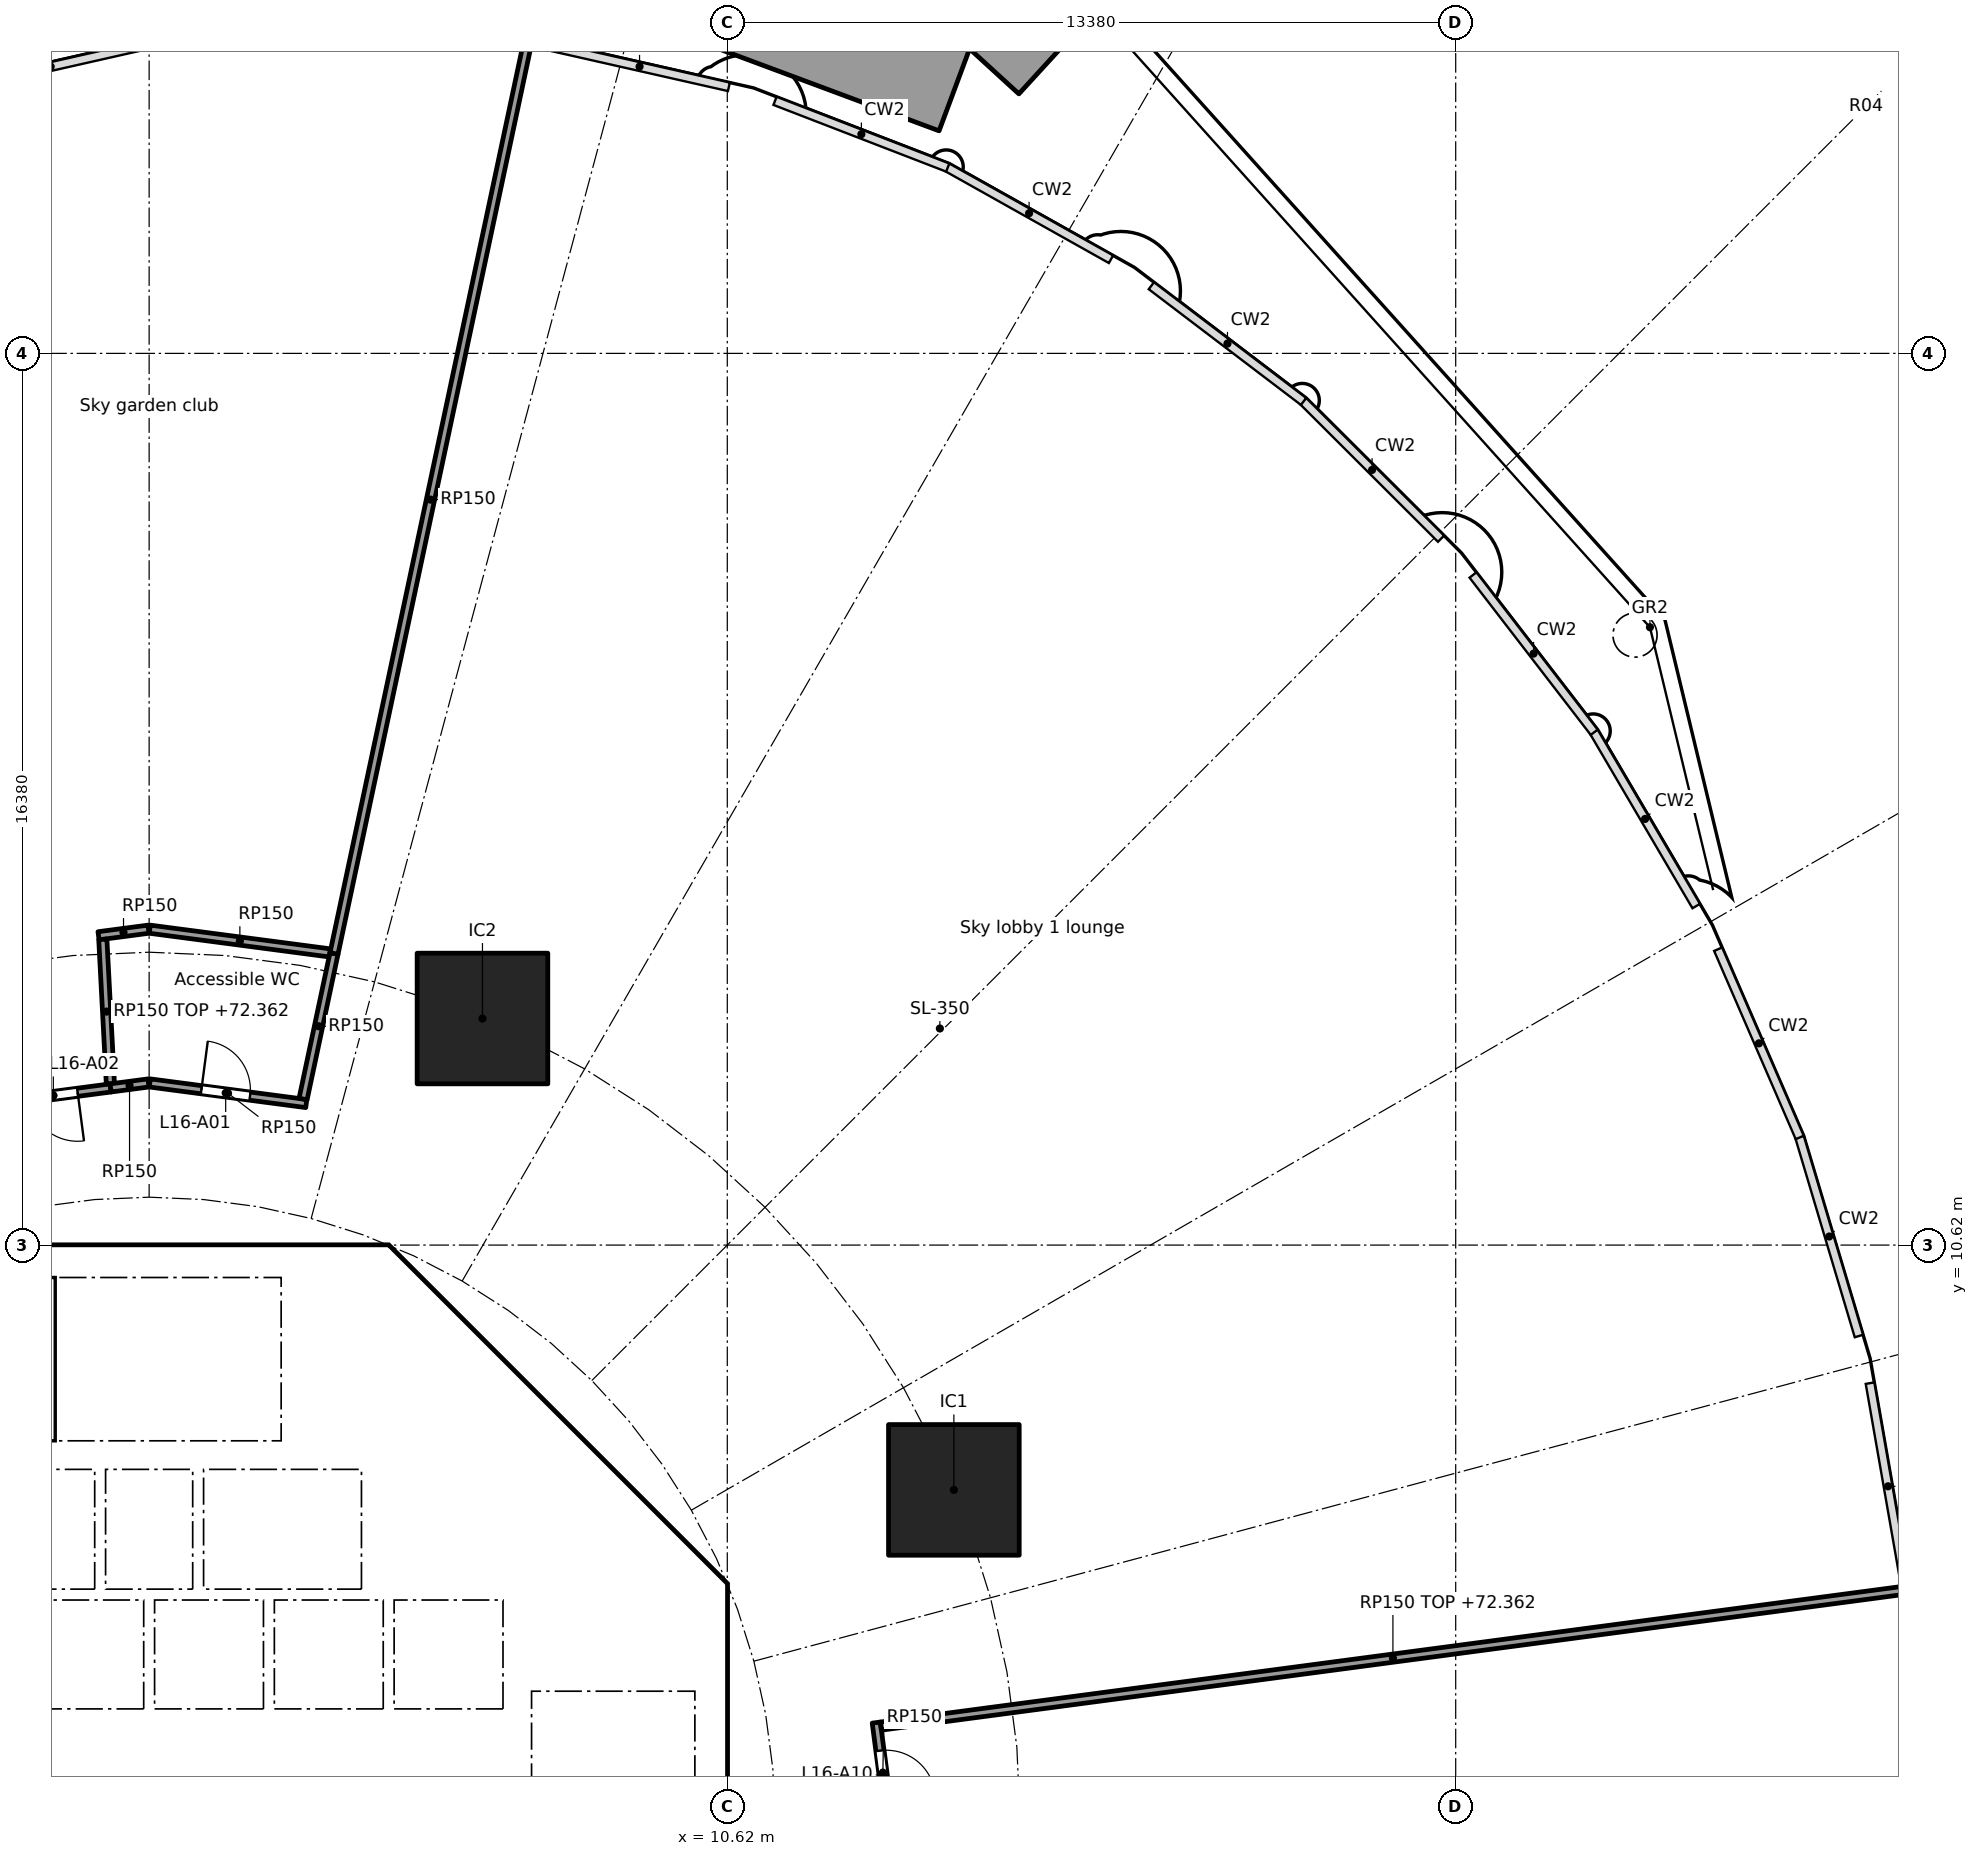
"""IFC4 building model, lengths in metres.
Left out: names, types, materials, properties, quantities, classifications, styles, units other than length and angle.
Written with IfcOpenShell. Run it as: python <this file> out.ifc"""

import sys

from ifc_helpers import new_model, si_unit, direction, frame, frame_2d, origin, origin_2d, place, context, subcontext, project, spatial, polyline, rectangle, outline, extrude, element, fill, save


model = new_model("IFC4")
c1 = context("Model", 3, precision=1e-05, world=origin(), true_north=direction((0.0, 1.0)))
c2 = subcontext(c1, "Body", "Model", "MODEL_VIEW")
j1 = project(units=[si_unit("LENGTHUNIT", "METRE"), si_unit("PLANEANGLEUNIT", "RADIAN")], contexts=[c1])
p1 = place(None, origin())
s1 = spatial("IfcSite", under=j1, at=p1, CompositionType="ELEMENT")
p2 = place(p1, origin())
s2 = spatial("IfcBuilding", under=s1, at=p2, CompositionType="ELEMENT")
p3 = place(p2, frame((0.0, 0.0, 67.7)))
s3 = spatial("IfcBuildingStorey", under=s2, at=p3, CompositionType="ELEMENT", Elevation=67.7)
for number, where, z_axis, x_axis in (
    (1, (14.782, 6.123, 0.0), (0.0, 0.0, 1.0), (1.0, 0.0, 0.0)),
    (2, (6.123, 14.782, 0.0), (0.0, 0.0, 1.0), (1.0, 0.0, 0.0)),
):
    element("IfcColumn", number, at=place(p3, frame(where, z_axis=z_axis, x_axis=x_axis)), inside=s3, PredefinedType="COLUMN", context=c2, shape_type="SweptSolid", body=[
        extrude(rectangle(XDim=2.4, YDim=2.4, at=origin_2d()), origin(), (0.0, 0.0, 1.0), 5.6),
    ])
p4 = place(p3, frame((13.458, 35.156, 0.0), z_axis=(0.0, 0.0, 1.0), x_axis=(0.737628171865, -0.67520713864, 0.0)))
e3 = element("IfcWall", 3, at=p4, inside=s3, PredefinedType="SOLIDWALL", context=c2, shape_type="SweptSolid", body=[
    extrude(rectangle(XDim=4.146, YDim=1.6, at=frame_2d((2.073, 0.0))), origin(), (0.0, 0.0, 1.0), 1.1),
])
p5 = place(p3, frame((14.789, 31.838, 0.0), z_axis=(0.0, 0.0, 1.0), x_axis=(-0.937198795284, 0.348795668148, 0.0)))
e4 = element("IfcWall", 4, at=p5, inside=s3, PredefinedType="SOLIDWALL", context=c2, shape_type="SweptSolid", body=[
    extrude(rectangle(XDim=9.981, YDim=1.6, at=frame_2d((4.991, 0.0))), origin(), (0.0, 0.0, 1.0), 1.1),
])
p6 = place(p3, frame((9.988, 4.613, 0.0), z_axis=(0.0, 0.0, 1.0), x_axis=(-0.707106781187, 0.707106781187, 0.0)))
e5 = element("IfcWall", 5, at=p6, inside=s3, PredefinedType="SHEAR", context=c2, shape_type="SweptSolid", body=[
    extrude(rectangle(XDim=7.602, YDim=0.6, at=frame_2d((3.801, 0.0))), origin(), (0.0, 0.0, 1.0), 5.34),
])
p7 = place(p6, frame((3.201, 0.0, 0.0)))
e6 = element("IfcOpeningElement", 6, at=p7, cuts=e5, PredefinedType="OPENING", context=c2, shape_type="SweptSolid", body=[
    extrude(rectangle(XDim=1.2, YDim=2.1, at=frame_2d((0.6, 1.05))), frame((0.0, 0.31, 0.0), z_axis=(0.0, -1.0, 0.0), x_axis=(1.0, 0.0, 0.0)), (0.0, 0.0, 1.0), 0.62),
])
p8 = place(p3, frame((4.0, 4.3, 0.0), z_axis=(0.0, 0.0, 1.0), x_axis=(0.0, 1.0, 0.0)))
e7 = element("IfcWall", 7, at=p8, inside=s3, PredefinedType="SOLIDWALL", context=c2, shape_type="SweptSolid", body=[
    extrude(rectangle(XDim=2.2, YDim=0.2, at=frame_2d((1.1, 0.0))), origin(), (0.0, 0.0, 1.0), 5.34),
])
p9 = place(p8, frame((0.55, 0.0, 0.0)))
e8 = element("IfcOpeningElement", 8, at=p9, cuts=e7, PredefinedType="OPENING", context=c2, shape_type="SweptSolid", body=[
    extrude(rectangle(XDim=1.1, YDim=2.1, at=frame_2d((0.55, 1.05))), frame((0.0, 0.11, 0.0), z_axis=(0.0, -1.0, 0.0), x_axis=(1.0, 0.0, 0.0)), (0.0, 0.0, 1.0), 0.22),
])
p10 = place(p3, frame((-6.7, 2.0, 0.0), z_axis=(0.0, 0.0, 1.0), x_axis=(1.0, 0.0, 0.0)))
e9 = element("IfcWall", 9, at=p10, inside=s3, PredefinedType="SOLIDWALL", context=c2, shape_type="SweptSolid", body=[
    extrude(rectangle(XDim=13.4, YDim=0.2, at=frame_2d((6.7, 0.0))), origin(), (0.0, 0.0, 1.0), 5.34),
])
p11 = place(p10, frame((0.65, 0.0, 0.0)))
e10 = element("IfcOpeningElement", 10, at=p11, cuts=e9, PredefinedType="OPENING", context=c2, shape_type="SweptSolid", body=[
    extrude(rectangle(XDim=1.1, YDim=2.1, at=frame_2d((0.55, 1.05))), frame((0.0, 0.11, 0.0), z_axis=(0.0, -1.0, 0.0), x_axis=(1.0, 0.0, 0.0)), (0.0, 0.0, 1.0), 0.22),
])
p12 = place(p10, frame((2.85, 0.0, 0.0)))
e11 = element("IfcOpeningElement", 11, at=p12, cuts=e9, PredefinedType="OPENING", context=c2, shape_type="SweptSolid", body=[
    extrude(rectangle(XDim=1.1, YDim=2.1, at=frame_2d((0.55, 1.05))), frame((0.0, 0.11, 0.0), z_axis=(0.0, -1.0, 0.0), x_axis=(1.0, 0.0, 0.0)), (0.0, 0.0, 1.0), 0.22),
])
p13 = place(p10, frame((5.05, 0.0, 0.0)))
e12 = element("IfcOpeningElement", 12, at=p13, cuts=e9, PredefinedType="OPENING", context=c2, shape_type="SweptSolid", body=[
    extrude(rectangle(XDim=1.1, YDim=2.1, at=frame_2d((0.55, 1.05))), frame((0.0, 0.11, 0.0), z_axis=(0.0, -1.0, 0.0), x_axis=(1.0, 0.0, 0.0)), (0.0, 0.0, 1.0), 0.22),
])
p14 = place(p3, frame((6.7, 4.0, 0.0), z_axis=(0.0, 0.0, 1.0), x_axis=(1.0, 0.0, 0.0)))
e13 = element("IfcWall", 13, at=p14, inside=s3, PredefinedType="SOLIDWALL", context=c2, shape_type="SweptSolid", body=[
    extrude(rectangle(XDim=3.325, YDim=0.2, at=frame_2d((1.662, 0.0))), origin(), (0.0, 0.0, 1.0), 5.34),
])
p15 = place(p14, frame((1.25, 0.0, 0.0)))
e14 = element("IfcOpeningElement", 14, at=p15, cuts=e13, PredefinedType="OPENING", context=c2, shape_type="SweptSolid", body=[
    extrude(rectangle(XDim=1.1, YDim=2.1, at=frame_2d((0.55, 1.05))), frame((0.0, 0.11, 0.0), z_axis=(0.0, -1.0, 0.0), x_axis=(1.0, 0.0, 0.0)), (0.0, 0.0, 1.0), 0.22),
])
p16 = place(p3, frame((4.0, 7.025, 0.0), z_axis=(0.0, 0.0, 1.0), x_axis=(0.0, 1.0, 0.0)))
e15 = element("IfcWall", 15, at=p16, inside=s3, PredefinedType="SOLIDWALL", context=c2, shape_type="SweptSolid", body=[
    extrude(rectangle(XDim=3.0, YDim=0.2, at=frame_2d((1.5, 0.0))), origin(), (0.0, 0.0, 1.0), 5.34),
])
p17 = place(p16, frame((0.925, 0.0, 0.0)))
e16 = element("IfcOpeningElement", 16, at=p17, cuts=e15, PredefinedType="OPENING", context=c2, shape_type="SweptSolid", body=[
    extrude(rectangle(XDim=1.1, YDim=2.1, at=frame_2d((0.55, 1.05))), frame((0.0, 0.11, 0.0), z_axis=(0.0, -1.0, 0.0), x_axis=(1.0, 0.0, 0.0)), (0.0, 0.0, 1.0), 0.22),
])
p18 = place(p3, origin())
e17 = element("IfcWall", 17, at=p18, inside=s3, PredefinedType="SHEAR", context=c2, shape_type="SweptSolid", body=[
    extrude(outline(polyline([(-4.152, 10.025), (-4.401, 9.776), (-4.825, 10.2), (-4.401, 10.625), (4.401, 10.625), (4.825, 10.2), (4.401, 9.776), (4.152, 10.025), (-4.152, 10.025)])), origin(), (0.0, 0.0, 1.0), 5.34),
])
p19 = place(p3, origin())
e18 = element("IfcWall", 18, at=p19, inside=s3, PredefinedType="SHEAR", context=c2, shape_type="SweptSolid", body=[
    extrude(outline(polyline([(9.776, -4.401), (10.025, -4.152), (10.025, -3.801), (10.025, 4.152), (9.776, 4.401), (10.2, 4.825), (10.625, 4.401), (10.625, -4.401), (10.2, -4.825), (9.776, -4.401)])), origin(), (0.0, 0.0, 1.0), 5.34),
])
for number, where, z_axis, x_axis in (
    (19, (-0.9, 4.3, 0.0), (0.0, 0.0, 1.0), (0.0, 1.0, 0.0)),
    (20, (0.9, 4.3, 0.0), (0.0, 0.0, 1.0), (0.0, 1.0, 0.0)),
):
    element("IfcWall", number, at=place(p3, frame(where, z_axis=z_axis, x_axis=x_axis)), inside=s3, PredefinedType="SOLIDWALL", context=c2, shape_type="SweptSolid", body=[
        extrude(rectangle(XDim=2.2, YDim=0.2, at=frame_2d((1.1, 0.0))), origin(), (0.0, 0.0, 1.0), 5.34),
    ])
p20 = place(p3, origin())
e21 = element("IfcWall", 21, at=p20, inside=s3, PredefinedType="SOLIDWALL", context=c2, shape_type="SweptSolid", body=[
    extrude(outline(polyline([(-6.5, 2.1), (-6.7, 2.1), (-6.7, 4.3), (6.7, 4.3), (6.7, 2.1), (6.5, 2.1), (6.5, 4.1), (4.5, 4.1), (4.5, 2.1), (4.3, 2.1), (4.3, 4.1), (2.3, 4.1), (2.3, 2.1), (2.1, 2.1), (2.1, 4.1), (0.1, 4.1), (0.1, 2.1), (-0.1, 2.1), (-0.1, 4.1), (-2.1, 4.1), (-2.1, 2.1), (-2.3, 2.1), (-2.3, 4.1), (-4.3, 4.1), (-4.3, 2.1), (-4.5, 2.1), (-4.5, 4.1), (-6.5, 4.1), (-6.5, 2.1)])), origin(), (0.0, 0.0, 1.0), 5.34),
])
p21 = place(p3, origin())
e22 = element("IfcWall", 22, at=p21, inside=s3, PredefinedType="SOLIDWALL", context=c2, shape_type="SweptSolid", body=[
    extrude(outline(polyline([(4.1, 6.5), (-4.1, 6.5), (-4.1, 7.025), (4.1, 7.025), (4.1, 6.5)])), origin(), (0.0, 0.0, 1.0), 5.34),
])
p22 = place(p3, origin())
e23 = element("IfcWall", 23, at=p22, inside=s3, PredefinedType="SOLIDWALL", context=c2, shape_type="SweptSolid", body=[
    extrude(outline(polyline([(7.025, -3.9), (6.7, -3.9), (6.7, 3.9), (7.025, 3.9), (7.025, -3.9)])), origin(), (0.0, 0.0, 1.0), 5.34),
])
p23 = place(p3, frame((-2.812, 13.23, 0.0), z_axis=(0.0, 0.0, 1.0), x_axis=(0.991438625664, 0.130573548402, 0.0)))
e24 = element("IfcWall", 24, at=p23, inside=s3, PredefinedType="PARTITIONING", context=c2, shape_type="SweptSolid", body=[
    extrude(rectangle(XDim=2.122, YDim=0.15, at=frame_2d((1.061, 0.0))), origin(), (0.0, 0.0, 1.0), 5.34),
])
p24 = place(p23, frame((0.611, 0.0, 0.0)))
e25 = element("IfcOpeningElement", 25, at=p24, cuts=e24, PredefinedType="OPENING", context=c2, shape_type="SweptSolid", body=[
    extrude(rectangle(XDim=0.9, YDim=2.1, at=frame_2d((0.45, 1.05))), frame((0.0, 0.085, 0.0), z_axis=(0.0, -1.0, 0.0), x_axis=(1.0, 0.0, 0.0)), (0.0, 0.0, 1.0), 0.17),
])
p25 = place(p3, frame((-0.929, 16.302, 0.0), z_axis=(0.0, 0.0, 1.0), x_axis=(0.991440824405, 0.130556852376, 0.0)))
e26 = element("IfcWall", 26, at=p25, inside=s3, PredefinedType="PARTITIONING", context=c2, shape_type="SweptSolid", body=[
    extrude(rectangle(XDim=0.926, YDim=0.15, at=frame_2d((0.463, 0.0))), origin(), (0.0, 0.0, 1.0), 5.34),
])
p26 = place(p3, frame((-0.712, 13.582, 0.0), z_axis=(0.0, 0.0, 1.0), x_axis=(-0.05235154686, 0.998628717563, 0.0)))
e27 = element("IfcWall", 27, at=p26, inside=s3, PredefinedType="PARTITIONING", context=c2, shape_type="SweptSolid", body=[
    extrude(rectangle(XDim=2.658, YDim=0.15, at=frame_2d((1.329, 0.0))), origin(), (0.0, 0.0, 1.0), 4.662),
])
p27 = place(p3, frame((-0.708, 13.507, 0.0), z_axis=(0.0, 0.0, 1.0), x_axis=(0.991466123966, 0.130364585024, 0.0)))
e28 = element("IfcWall", 28, at=p27, inside=s3, PredefinedType="PARTITIONING", context=c2, shape_type="SweptSolid", body=[
    extrude(rectangle(XDim=0.702, YDim=0.15, at=frame_2d((0.351, 0.0))), origin(), (0.0, 0.0, 1.0), 5.34),
])
p28 = place(p3, frame((0.012, 13.598, 0.0), z_axis=(0.0, 0.0, 1.0), x_axis=(0.991448563319, -0.13049807007, 0.0)))
e29 = element("IfcWall", 29, at=p28, inside=s3, PredefinedType="PARTITIONING", context=c2, shape_type="SweptSolid", body=[
    extrude(rectangle(XDim=2.9, YDim=0.15, at=frame_2d((1.45, 0.0))), origin(), (0.0, 0.0, 1.0), 5.34),
])
p29 = place(p28, frame((0.956, 0.0, 0.0)))
e30 = element("IfcOpeningElement", 30, at=p29, cuts=e29, PredefinedType="OPENING", context=c2, shape_type="SweptSolid", body=[
    extrude(rectangle(XDim=0.9, YDim=2.1, at=frame_2d((0.45, 1.05))), frame((0.0, 0.085, 0.0), z_axis=(0.0, -1.0, 0.0), x_axis=(1.0, 0.0, 0.0)), (0.0, 0.0, 1.0), 0.17),
])
p30 = place(p3, frame((0.012, 16.423, 0.0), z_axis=(0.0, 0.0, 1.0), x_axis=(0.991441844339, -0.130549106827, 0.0)))
e31 = element("IfcWall", 31, at=p30, inside=s3, PredefinedType="PARTITIONING", context=c2, shape_type="SweptSolid", body=[
    extrude(rectangle(XDim=3.338, YDim=0.15, at=frame_2d((1.669, 0.0))), origin(), (0.0, 0.0, 1.0), 5.34),
])
p31 = place(p3, frame((2.828, 13.303, 0.0), z_axis=(0.0, 0.0, 1.0), x_axis=(0.207936738153, 0.978142276423, 0.0)))
e32 = element("IfcWall", 32, at=p31, inside=s3, PredefinedType="PARTITIONING", context=c2, shape_type="SweptSolid", body=[
    extrude(rectangle(XDim=2.733, YDim=0.15, at=frame_2d((1.367, 0.0))), origin(), (0.0, 0.0, 1.0), 5.34),
])
p32 = place(p3, frame((3.396, 15.977, 0.0), z_axis=(0.0, 0.0, 1.0), x_axis=(0.207917852081, 0.978146291097, 0.0)))
e33 = element("IfcWall", 33, at=p32, inside=s3, PredefinedType="PARTITIONING", context=c2, shape_type="SweptSolid", body=[
    extrude(rectangle(XDim=17.046, YDim=0.15, at=frame_2d((8.523, 0.0))), origin(), (0.0, 0.0, 1.0), 5.34),
])
p33 = place(p3, frame((13.357, 1.848, 0.0), z_axis=(0.0, 0.0, 1.0), x_axis=(0.130471558159, -0.991452052553, 0.0)))
e34 = element("IfcWall", 34, at=p33, inside=s3, PredefinedType="PARTITIONING", context=c2, shape_type="SweptSolid", body=[
    extrude(rectangle(XDim=1.853, YDim=0.15, at=frame_2d((0.926, 0.0))), origin(), (0.0, 0.0, 1.0), 5.34),
])
p34 = place(p33, frame((0.52, 0.0, 0.0)))
e35 = element("IfcOpeningElement", 35, at=p34, cuts=e34, PredefinedType="OPENING", context=c2, shape_type="SweptSolid", body=[
    extrude(rectangle(XDim=0.9, YDim=2.1, at=frame_2d((0.45, 1.05))), frame((0.0, 0.085, 0.0), z_axis=(0.0, -1.0, 0.0), x_axis=(1.0, 0.0, 0.0)), (0.0, 0.0, 1.0), 0.17),
])
p35 = place(p3, frame((32.253, 4.281, 0.0), z_axis=(0.0, 0.0, 1.0), x_axis=(-0.991305479384, -0.131580570535, 0.0)))
e36 = element("IfcWall", 36, at=p35, inside=s3, PredefinedType="PARTITIONING", context=c2, shape_type="SweptSolid", body=[
    extrude(rectangle(XDim=18.978, YDim=0.15, at=frame_2d((9.489, 0.0))), origin(), (0.0, 0.0, 1.0), 4.662),
])
p36 = place(p13, origin())
e37 = element("IfcDoor", 37, at=p36, inside=s3, OperationType="DOUBLE_DOOR_SLIDING", PredefinedType="DOOR", context=c2, shape_type="SweptSolid", body=[
    extrude(rectangle(XDim=1.1, YDim=2.1, at=frame_2d((0.55, 1.05))), frame((0.0, 0.025, 0.0), z_axis=(0.0, -1.0, 0.0), x_axis=(1.0, 0.0, 0.0)), (0.0, 0.0, 1.0), 0.05),
])
fill(e12, e37)
p37 = place(p9, origin())
e38 = element("IfcDoor", 38, at=p37, inside=s3, OperationType="DOUBLE_DOOR_SLIDING", PredefinedType="DOOR", context=c2, shape_type="SweptSolid", body=[
    extrude(rectangle(XDim=1.1, YDim=2.1, at=frame_2d((0.55, 1.05))), frame((0.0, 0.025, 0.0), z_axis=(0.0, -1.0, 0.0), x_axis=(1.0, 0.0, 0.0)), (0.0, 0.0, 1.0), 0.05),
])
fill(e8, e38)
p38 = place(p15, frame((1.1, 0.0, 0.0), x_axis=(-1.0, 0.0, 0.0)))
e39 = element("IfcDoor", 39, at=p38, inside=s3, OperationType="SINGLE_SWING_LEFT", PredefinedType="DOOR", context=c2, shape_type="SweptSolid", body=[
    extrude(rectangle(XDim=1.1, YDim=2.1, at=frame_2d((0.55, 1.05))), frame((0.0, 0.025, 0.0), z_axis=(0.0, -1.0, 0.0), x_axis=(1.0, 0.0, 0.0)), (0.0, 0.0, 1.0), 0.05),
])
fill(e14, e39)
p39 = place(p17, origin())
e40 = element("IfcDoor", 40, at=p39, inside=s3, OperationType="SINGLE_SWING_RIGHT", PredefinedType="DOOR", context=c2, shape_type="SweptSolid", body=[
    extrude(rectangle(XDim=1.1, YDim=2.1, at=frame_2d((0.55, 1.05))), frame((0.0, 0.025, 0.0), z_axis=(0.0, -1.0, 0.0), x_axis=(1.0, 0.0, 0.0)), (0.0, 0.0, 1.0), 0.05),
])
fill(e16, e40)
p40 = place(p7, origin())
e41 = element("IfcDoor", 41, at=p40, inside=s3, OperationType="SINGLE_SWING_LEFT", PredefinedType="DOOR", context=c2, shape_type="SweptSolid", body=[
    extrude(rectangle(XDim=1.2, YDim=2.1, at=frame_2d((0.6, 1.05))), frame((0.0, 0.025, 0.0), z_axis=(0.0, -1.0, 0.0), x_axis=(1.0, 0.0, 0.0)), (0.0, 0.0, 1.0), 0.05),
])
fill(e6, e41)
p41 = place(p29, origin())
e42 = element("IfcDoor", 42, at=p41, inside=s3, OperationType="SINGLE_SWING_LEFT", PredefinedType="DOOR", context=c2, shape_type="SweptSolid", body=[
    extrude(rectangle(XDim=0.9, YDim=2.1, at=frame_2d((0.45, 1.05))), frame((0.0, 0.025, 0.0), z_axis=(0.0, -1.0, 0.0), x_axis=(1.0, 0.0, 0.0)), (0.0, 0.0, 1.0), 0.05),
])
fill(e30, e42)
p42 = place(p24, frame((0.9, 0.0, 0.0), x_axis=(-1.0, 0.0, 0.0)))
e43 = element("IfcDoor", 43, at=p42, inside=s3, OperationType="SINGLE_SWING_LEFT", PredefinedType="DOOR", context=c2, shape_type="SweptSolid", body=[
    extrude(rectangle(XDim=0.9, YDim=2.1, at=frame_2d((0.45, 1.05))), frame((0.0, 0.025, 0.0), z_axis=(0.0, -1.0, 0.0), x_axis=(1.0, 0.0, 0.0)), (0.0, 0.0, 1.0), 0.05),
])
fill(e25, e43)
p43 = place(p34, origin())
e44 = element("IfcDoor", 44, at=p43, inside=s3, OperationType="SINGLE_SWING_RIGHT", PredefinedType="DOOR", context=c2, shape_type="SweptSolid", body=[
    extrude(rectangle(XDim=0.9, YDim=2.1, at=frame_2d((0.45, 1.05))), frame((0.0, 0.025, 0.0), z_axis=(0.0, -1.0, 0.0), x_axis=(1.0, 0.0, 0.0)), (0.0, 0.0, 1.0), 0.05),
])
fill(e35, e44)
save(model, sys.argv[1])
